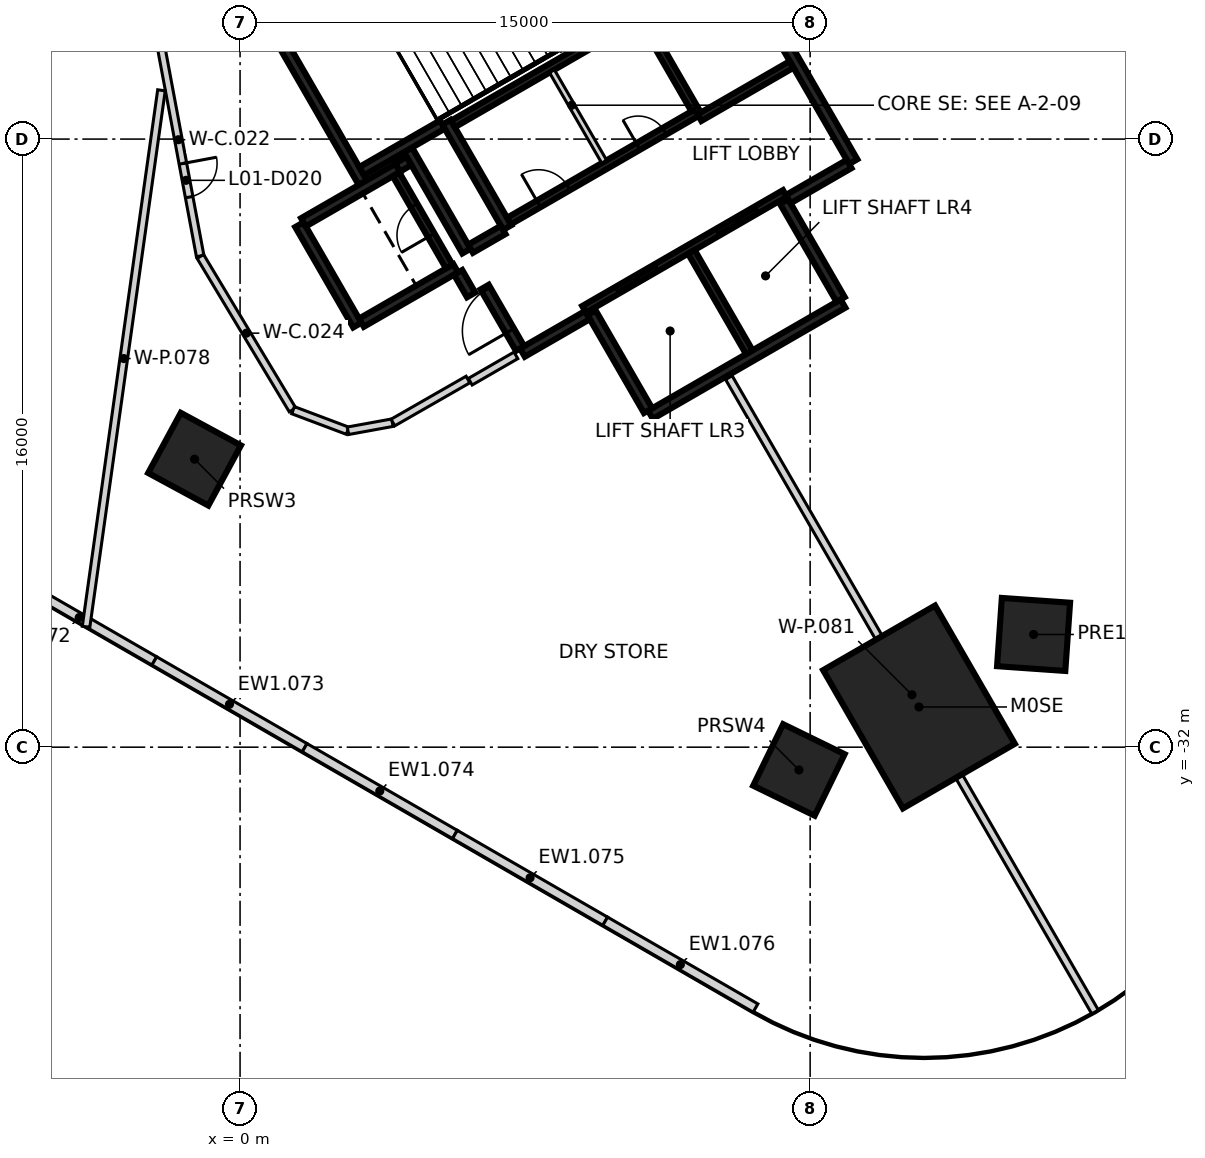
"""IFC4 building model, lengths in metres.
Left out: names, types, materials, properties, quantities, classifications, styles, units other than length and angle.
Written with IfcOpenShell. Run it as: python <this file> out.ifc"""

import sys

from ifc_helpers import new_model, si_unit, direction, frame, frame_2d, origin, origin_2d, place, context, subcontext, project, spatial, polyline, rectangle, outline, extrude, element, fill, save


model = new_model("IFC4")
c1 = context("Model", 3, precision=1e-05, world=origin(), true_north=direction((0.0, 1.0)))
c2 = subcontext(c1, "Body", "Model", "MODEL_VIEW")
j1 = project(units=[si_unit("LENGTHUNIT", "METRE"), si_unit("PLANEANGLEUNIT", "RADIAN")], contexts=[c1])
p1 = place(None, origin())
s1 = spatial("IfcSite", under=j1, at=p1, CompositionType="ELEMENT")
p2 = place(p1, origin())
s2 = spatial("IfcBuilding", under=s1, at=p2, CompositionType="ELEMENT")
p3 = place(p2, frame((0.0, 0.0, 7.5)))
s3 = spatial("IfcBuildingStorey", under=s2, at=p3, CompositionType="ELEMENT", Elevation=7.5)
p4 = place(p3, frame((17.865, -30.942, -0.4), z_axis=(0.0, 0.0, 1.0), x_axis=(-0.5, 0.866025403784, 0.0)))
e1 = element("IfcColumn", 1, at=p4, inside=s3, PredefinedType="COLUMN", context=c2, shape_type="SweptSolid", body=[
    extrude(rectangle(XDim=4.2, YDim=3.4, at=origin_2d()), origin(), (0.0, 0.0, 1.0), 6.55),
])
for number, where, z_axis, x_axis in (
    (2, (20.879, -29.034, -0.4), (0.0, 0.0, 1.0), (-0.998, 0.07, 0.0)),
    (3, (-1.197, -24.423, -0.4), (0.0, 0.0, 1.0), (0.476, 0.879, 0.0)),
    (4, (14.705, -32.599, -0.4), (0.0, 0.0, 1.0), (0.438, 0.899, 0.0)),
):
    element("IfcColumn", number, at=place(p3, frame(where, z_axis=z_axis, x_axis=x_axis)), inside=s3, PredefinedType="COLUMN", context=c2, shape_type="SweptSolid", body=[
        extrude(rectangle(XDim=1.8, YDim=1.8, at=origin_2d()), origin(), (0.0, 0.0, 1.0), 4.15),
    ])
for number, where, z_axis, x_axis in (
    (5, (-2.256, -29.73, 0.0), (0.0, 0.0, 1.0), (-0.866, 0.5, 0.0)),
    (6, (1.699, -32.013, 0.0), (0.0, 0.0, 1.0), (-0.866, 0.5, 0.0)),
):
    element("IfcWall", number, at=place(p3, frame(where, z_axis=z_axis, x_axis=x_axis)), inside=s3, PredefinedType="SOLIDWALL", context=c2, shape_type="SweptSolid", body=[
        extrude(rectangle(XDim=4.566, YDim=0.25, at=frame_2d((2.283, 0.0))), origin(), (0.0, 0.0, 1.0), 6.15),
    ])
p5 = place(p3, frame((5.653, -34.297, 0.0), z_axis=(0.0, 0.0, 1.0), x_axis=(-0.866010176527, 0.500026373457, 0.0)))
e7 = element("IfcWall", 7, at=p5, inside=s3, PredefinedType="SOLIDWALL", context=c2, shape_type="SweptSolid", body=[
    extrude(rectangle(XDim=4.566, YDim=0.25, at=frame_2d((2.283, 0.0))), origin(), (0.0, 0.0, 1.0), 6.15),
])
p6 = place(p3, frame((9.608, -36.58, 0.0), z_axis=(0.0, 0.0, 1.0), x_axis=(-0.866023543838, 0.500003221507, 0.0)))
e8 = element("IfcWall", 8, at=p6, inside=s3, PredefinedType="SOLIDWALL", context=c2, shape_type="SweptSolid", body=[
    extrude(rectangle(XDim=4.566, YDim=0.25, at=frame_2d((2.283, 0.0))), origin(), (0.0, 0.0, 1.0), 6.15),
])
p7 = place(p3, frame((13.562, -38.863, 0.0), z_axis=(0.0, 0.0, 1.0), x_axis=(-0.866046694585, 0.499963121439, 0.0)))
e9 = element("IfcWall", 9, at=p7, inside=s3, PredefinedType="SOLIDWALL", context=c2, shape_type="SweptSolid", body=[
    extrude(rectangle(XDim=4.566, YDim=0.25, at=frame_2d((2.283, 0.0))), origin(), (0.0, 0.0, 1.0), 6.15),
])
p8 = place(p3, origin())
e10 = element("IfcWall", 10, at=p8, inside=s3, PredefinedType="SOLIDWALL", context=c2, shape_type="SweptSolid", body=[
    extrude(outline(polyline([(13.5, -38.971), (14.556, -39.492), (15.671, -39.87), (16.244, -40.004), (17.411, -40.158), (18.589, -40.158), (19.175, -40.1), (20.329, -39.87), (21.444, -39.492), (22.5, -38.971), (23.0, -38.66), (23.479, -38.317), (24.364, -37.541), (25.14, -36.656), (25.483, -36.177), (26.072, -35.157), (26.522, -34.07), (26.827, -32.933), (26.981, -31.766), (27.0, -31.177), (26.75, -31.169), (26.731, -31.745), (26.581, -32.884), (26.285, -33.989), (25.847, -35.047), (25.273, -36.042), (24.944, -36.5), (24.187, -37.364), (23.323, -38.121), (22.861, -38.452), (22.378, -38.752), (21.348, -39.26), (20.265, -39.628), (19.138, -39.852), (18.576, -39.908), (17.428, -39.908), (16.289, -39.758), (15.739, -39.63), (14.652, -39.26), (13.611, -38.747), (13.5, -38.971)])), origin(), (0.0, 0.0, 1.0), 6.15),
])
p9 = place(p3, frame((13.008, -11.181, 0.0), z_axis=(0.0, 0.0, 1.0), x_axis=(0.500004234368, -0.866022959057, 0.0)))
e11 = element("IfcWall", 11, at=p9, inside=s3, PredefinedType="SHEAR", context=c2, shape_type="SweptSolid", body=[
    extrude(rectangle(XDim=6.25, YDim=0.25, at=frame_2d((3.125, 0.0))), origin(), (0.0, 0.0, 1.0), 6.15),
])
p10 = place(p3, frame((15.865, -20.328, 0.0), z_axis=(0.0, 0.0, 1.0), x_axis=(-0.86602852612, -0.499994591916, 0.0)))
e12 = element("IfcWall", 12, at=p10, inside=s3, PredefinedType="SHEAR", context=c2, shape_type="SweptSolid", body=[
    extrude(rectangle(XDim=5.85, YDim=0.25, at=frame_2d((2.925, 0.0))), origin(), (0.0, 0.0, 1.0), 6.15),
])
p11 = place(p3, frame((3.235, -17.153, 0.0), z_axis=(0.0, 0.0, 1.0), x_axis=(-0.500008851346, 0.866020293397, 0.0)))
e13 = element("IfcWall", 13, at=p11, inside=s3, PredefinedType="SHEAR", context=c2, shape_type="SweptSolid", body=[
    extrude(rectangle(XDim=5.51, YDim=0.25, at=frame_2d((2.755, 0.0))), origin(), (0.0, 0.0, 1.0), 6.15),
])
p12 = place(p3, frame((7.031, -18.327, 0.0), z_axis=(0.0, 0.0, 1.0), x_axis=(-0.499971222258, 0.866042017984, 0.0)))
e14 = element("IfcWall", 14, at=p12, inside=s3, PredefinedType="SHEAR", context=c2, shape_type="SweptSolid", body=[
    extrude(rectangle(XDim=3.2, YDim=0.25, at=frame_2d((1.6, 0.0))), origin(), (0.0, 0.0, 1.0), 6.15),
])
for number, where, z_axis, x_axis in (
    (15, (14.315, -17.644, 0.0), (0.0, 0.0, 1.0), (0.5, -0.866, 0.0)),
    (16, (10.736, -23.145, 0.0), (0.0, 0.0, 1.0), (-0.5, 0.866, 0.0)),
):
    element("IfcWall", number, at=place(p3, frame(where, z_axis=z_axis, x_axis=x_axis)), inside=s3, PredefinedType="SHEAR", context=c2, shape_type="SweptSolid", body=[
        extrude(rectangle(XDim=2.974, YDim=0.25, at=frame_2d((1.487, 0.0))), origin(), (0.0, 0.0, 1.0), 6.15),
    ])
p13 = place(p3, frame((3.085, -20.894, 0.0), z_axis=(0.0, 0.0, 1.0), x_axis=(-0.499978833458, 0.866037623948, 0.0)))
e17 = element("IfcWall", 17, at=p13, inside=s3, PredefinedType="SHEAR", context=c2, shape_type="SweptSolid", body=[
    extrude(rectangle(XDim=3.05, YDim=0.25, at=frame_2d((1.525, 0.0))), origin(), (0.0, 0.0, 1.0), 6.15),
])
p14 = place(p3, frame((1.669, -18.19, 0.0), z_axis=(0.0, 0.0, 1.0), x_axis=(0.866042235819, 0.499970844928, 0.0)))
e18 = element("IfcWall", 18, at=p14, inside=s3, PredefinedType="SHEAR", context=c2, shape_type="SweptSolid", body=[
    extrude(rectangle(XDim=2.865, YDim=0.25, at=frame_2d((1.432, 0.0))), origin(), (0.0, 0.0, 1.0), 6.15),
])
p15 = place(p3, frame((5.675, -19.399, 0.0), z_axis=(0.0, 0.0, 1.0), x_axis=(-0.866026637627, -0.499997862916, 0.0)))
e19 = element("IfcWall", 19, at=p15, inside=s3, PredefinedType="SHEAR", context=c2, shape_type="SweptSolid", body=[
    extrude(rectangle(XDim=2.865, YDim=0.25, at=frame_2d((1.432, 0.0))), origin(), (0.0, 0.0, 1.0), 6.15),
])
p16 = place(p3, frame((4.414, -16.276, 0.0), z_axis=(0.0, 0.0, 1.0), x_axis=(0.500003324108, -0.866023484601, 0.0)))
e20 = element("IfcWall", 20, at=p16, inside=s3, PredefinedType="SHEAR", context=c2, shape_type="SweptSolid", body=[
    extrude(rectangle(XDim=3.085, YDim=0.25, at=frame_2d((1.542, 0.0))), origin(), (0.0, 0.0, 1.0), 6.15),
])
p17 = place(p3, frame((5.322, -15.619, 0.0), z_axis=(0.0, 0.0, 1.0), x_axis=(-0.866026229868, -0.499998569178, 0.0)))
e21 = element("IfcWall", 21, at=p17, inside=s3, PredefinedType="SHEAR", context=c2, shape_type="SweptSolid", body=[
    extrude(rectangle(XDim=2.449, YDim=0.25, at=frame_2d((1.225, 0.0))), origin(), (0.0, 0.0, 1.0), 6.15),
])
p18 = place(p3, frame((9.14, -20.631, 0.0), z_axis=(0.0, 0.0, 1.0), x_axis=(-0.866043531843, -0.499968599967, 0.0)))
e22 = element("IfcWall", 22, at=p18, inside=s3, PredefinedType="SHEAR", context=c2, shape_type="SweptSolid", body=[
    extrude(rectangle(XDim=1.975, YDim=0.25, at=frame_2d((0.987, 0.0))), origin(), (0.0, 0.0, 1.0), 6.15),
])
p19 = place(p3, frame((16.025, -16.656, 0.0), z_axis=(0.0, 0.0, 1.0), x_axis=(-0.866016279763, -0.500015802937, 0.0)))
e23 = element("IfcWall", 23, at=p19, inside=s3, PredefinedType="SHEAR", context=c2, shape_type="SweptSolid", body=[
    extrude(rectangle(XDim=1.849, YDim=0.25, at=frame_2d((0.925, 0.0))), origin(), (0.0, 0.0, 1.0), 6.15),
])
p20 = place(p3, frame((7.367, -21.51, 0.0), z_axis=(0.0, 0.0, 1.0), x_axis=(-0.499983108224, 0.866035156036, 0.0)))
e24 = element("IfcWall", 24, at=p20, inside=s3, PredefinedType="SHEAR", context=c2, shape_type="SweptSolid", body=[
    extrude(rectangle(XDim=1.865, YDim=0.25, at=frame_2d((0.932, 0.0))), origin(), (0.0, 0.0, 1.0), 6.15),
])
p21 = place(p20, frame((0.535, 0.0, 0.0)))
e25 = element("IfcOpeningElement", 25, at=p21, cuts=e24, PredefinedType="OPENING", context=c2, shape_type="SweptSolid", body=[
    extrude(rectangle(XDim=1.25, YDim=2.1, at=frame_2d((0.625, 1.05))), frame((0.0, 0.135, 0.0), z_axis=(0.0, -1.0, 0.0), x_axis=(1.0, 0.0, 0.0)), (0.0, 0.0, 1.0), 0.27),
])
p22 = place(p3, frame((6.065, -18.885, 0.0), z_axis=(0.0, 0.0, 1.0), x_axis=(0.866017078145, 0.500014420154, 0.0)))
e26 = element("IfcWall", 26, at=p22, inside=s3, PredefinedType="SHEAR", context=c2, shape_type="SweptSolid", body=[
    extrude(rectangle(XDim=0.989, YDim=0.25, at=frame_2d((0.495, 0.0))), origin(), (0.0, 0.0, 1.0), 6.15),
])
p23 = place(p3, frame((6.08, -20.1, 0.0), z_axis=(0.0, 0.0, 1.0), x_axis=(-0.500051773299, 0.865995510393, 0.0)))
e27 = element("IfcWall", 27, at=p23, inside=s3, PredefinedType="SHEAR", context=c2, shape_type="SweptSolid", body=[
    extrude(rectangle(XDim=0.685, YDim=0.25, at=frame_2d((0.342, 0.0))), origin(), (0.0, 0.0, 1.0), 6.15),
])
p24 = place(p3, frame((4.145, -16.749, 0.0), z_axis=(0.0, 0.0, 1.0), x_axis=(0.866185586049, 0.49972245349, 0.0)))
e28 = element("IfcWall", 28, at=p24, inside=s3, PredefinedType="SHEAR", context=c2, shape_type="SweptSolid", body=[
    extrude(rectangle(XDim=0.344, YDim=0.25, at=frame_2d((0.172, 0.0))), origin(), (0.0, 0.0, 1.0), 6.15),
])
p25 = place(p3, frame((9.052, -20.48, 0.0), z_axis=(0.0, 0.0, 1.0), x_axis=(0.866030299012, 0.499991521122, 0.0)))
e29 = element("IfcWall", 29, at=p25, inside=s3, PredefinedType="SHEAR", context=c2, shape_type="SweptSolid", body=[
    extrude(rectangle(XDim=6.1, YDim=0.2, at=frame_2d((3.05, 0.0))), origin(), (0.0, 0.0, 1.0), 6.15),
])
p26 = place(p25, frame((1.0, 0.0, 0.0)))
e30 = element("IfcOpeningElement", 30, at=p26, cuts=e29, PredefinedType="OPENING", context=c2, shape_type="SweptSolid", body=[
    extrude(rectangle(XDim=1.2, YDim=2.1, at=frame_2d((0.6, 1.05))), frame((0.0, 0.11, 0.0), z_axis=(0.0, -1.0, 0.0), x_axis=(1.0, 0.0, 0.0)), (0.0, 0.0, 1.0), 0.22),
])
p27 = place(p25, frame((4.05, 0.0, 0.0)))
e31 = element("IfcOpeningElement", 31, at=p27, cuts=e29, PredefinedType="OPENING", context=c2, shape_type="SweptSolid", body=[
    extrude(rectangle(XDim=1.2, YDim=2.1, at=frame_2d((0.6, 1.05))), frame((0.0, 0.11, 0.0), z_axis=(0.0, -1.0, 0.0), x_axis=(1.0, 0.0, 0.0)), (0.0, 0.0, 1.0), 0.22),
])
p28 = place(p3, frame((10.538, -12.752, 0.0), z_axis=(0.0, 0.0, 1.0), x_axis=(-0.866038630372, -0.499977090179, 0.0)))
e32 = element("IfcWall", 32, at=p28, inside=s3, PredefinedType="SHEAR", context=c2, shape_type="SweptSolid", body=[
    extrude(rectangle(XDim=5.699, YDim=0.2, at=frame_2d((2.85, 0.0))), origin(), (0.0, 0.0, 1.0), 6.15),
])
p29 = place(p3, frame((7.077, -18.156, 0.0), z_axis=(0.0, 0.0, 1.0), x_axis=(0.866038630372, 0.499977090179, 0.0)))
e33 = element("IfcWall", 33, at=p29, inside=s3, PredefinedType="SHEAR", context=c2, shape_type="SweptSolid", body=[
    extrude(rectangle(XDim=5.699, YDim=0.2, at=frame_2d((2.85, 0.0))), origin(), (0.0, 0.0, 1.0), 6.15),
])
p30 = place(p29, frame((0.899, 0.0, 0.0)))
e34 = element("IfcOpeningElement", 34, at=p30, cuts=e33, PredefinedType="OPENING", context=c2, shape_type="SweptSolid", body=[
    extrude(rectangle(XDim=0.9, YDim=2.1, at=frame_2d((0.45, 1.05))), frame((0.0, 0.11, 0.0), z_axis=(0.0, -1.0, 0.0), x_axis=(1.0, 0.0, 0.0)), (0.0, 0.0, 1.0), 0.22),
])
p31 = place(p29, frame((3.924, 0.0, 0.0)))
e35 = element("IfcOpeningElement", 35, at=p31, cuts=e33, PredefinedType="OPENING", context=c2, shape_type="SweptSolid", body=[
    extrude(rectangle(XDim=0.8, YDim=2.1, at=frame_2d((0.4, 1.05))), frame((0.0, 0.11, 0.0), z_axis=(0.0, -1.0, 0.0), x_axis=(1.0, 0.0, 0.0)), (0.0, 0.0, 1.0), 0.22),
])
p32 = place(p3, frame((11.875, -18.967, 0.0), z_axis=(0.0, 0.0, 1.0), x_axis=(0.49998131003, -0.866036194175, 0.0)))
e36 = element("IfcWall", 36, at=p32, inside=s3, PredefinedType="SHEAR", context=c2, shape_type="SweptSolid", body=[
    extrude(rectangle(XDim=3.048, YDim=0.2, at=frame_2d((1.524, 0.0))), origin(), (0.0, 0.0, 1.0), 6.15),
])
p33 = place(p3, frame((5.503, -19.352, 0.0), z_axis=(0.0, 0.0, 1.0), x_axis=(-0.499986818241, 0.866033014143, 0.0)))
e37 = element("IfcWall", 37, at=p33, inside=s3, PredefinedType="SHEAR", context=c2, shape_type="SweptSolid", body=[
    extrude(rectangle(XDim=2.798, YDim=0.2, at=frame_2d((1.399, 0.0))), origin(), (0.0, 0.0, 1.0), 6.15),
])
p34 = place(p33, frame((0.949, 0.0, 0.0)))
e38 = element("IfcOpeningElement", 38, at=p34, cuts=e37, PredefinedType="OPENING", context=c2, shape_type="SweptSolid", body=[
    extrude(rectangle(XDim=0.9, YDim=2.1, at=frame_2d((0.45, 1.05))), frame((0.0, 0.11, 0.0), z_axis=(0.0, -1.0, 0.0), x_axis=(1.0, 0.0, 0.0)), (0.0, 0.0, 1.0), 0.22),
])
p35 = place(p3, frame((11.963, -15.22, 0.0), z_axis=(0.0, 0.0, 1.0), x_axis=(-0.500034990121, 0.866005201286, 0.0)))
e39 = element("IfcWall", 39, at=p35, inside=s3, PredefinedType="SHEAR", context=c2, shape_type="SweptSolid", body=[
    extrude(rectangle(XDim=2.75, YDim=0.2, at=frame_2d((1.375, 0.0))), origin(), (0.0, 0.0, 1.0), 6.15),
])
p36 = place(p3, frame((14.512, -14.037, 0.0), z_axis=(0.0, 0.0, 1.0), x_axis=(-0.866044696403, -0.499966582715, 0.0)))
e40 = element("IfcWall", 40, at=p36, inside=s3, PredefinedType="SHEAR", context=c2, shape_type="SweptSolid", body=[
    extrude(rectangle(XDim=2.799, YDim=0.2, at=frame_2d((1.399, 0.0))), origin(), (0.0, 0.0, 1.0), 6.15),
])
p37 = place(p3, frame((8.207, -14.214, 0.0), z_axis=(0.0, 0.0, 1.0), x_axis=(0.50002746344, -0.86600954718, 0.0)))
e41 = element("IfcWall", 41, at=p37, inside=s3, PredefinedType="PARTITIONING", context=c2, shape_type="SweptSolid", body=[
    extrude(rectangle(XDim=2.748, YDim=0.15, at=frame_2d((1.374, 0.0))), origin(), (0.0, 0.0, 1.0), 6.15),
])
p38 = place(p3, frame((-2.194, -12.956, 0.0), z_axis=(0.0, 0.0, 1.0), x_axis=(0.183765348318, -0.982970140318, 0.0)))
e42 = element("IfcWall", 42, at=p38, inside=s3, PredefinedType="PARTITIONING", context=c2, shape_type="SweptSolid", body=[
    extrude(rectangle(XDim=6.227, YDim=0.2, at=frame_2d((3.113, 0.0))), origin(), (0.0, 0.0, 1.0), 6.15),
])
p39 = place(p38, frame((3.75, 0.0, 0.0)))
e43 = element("IfcOpeningElement", 43, at=p39, cuts=e42, PredefinedType="OPENING", context=c2, shape_type="SweptSolid", body=[
    extrude(rectangle(XDim=0.9, YDim=2.1, at=frame_2d((0.45, 1.05))), frame((0.0, 0.11, 0.0), z_axis=(0.0, -1.0, 0.0), x_axis=(1.0, 0.0, 0.0)), (0.0, 0.0, 1.0), 0.22),
])
p40 = place(p3, frame((-1.045, -19.088, 0.0), z_axis=(0.0, 0.0, 1.0), x_axis=(0.51489213726, -0.857254971982, 0.0)))
e44 = element("IfcWall", 44, at=p40, inside=s3, PredefinedType="PARTITIONING", context=c2, shape_type="SweptSolid", body=[
    extrude(rectangle(XDim=4.709, YDim=0.2, at=frame_2d((2.354, 0.0))), origin(), (0.0, 0.0, 1.0), 6.15),
])
p41 = place(p3, frame((1.394, -23.133, 0.0), z_axis=(0.0, 0.0, 1.0), x_axis=(0.935740267615, -0.352689880154, 0.0)))
e45 = element("IfcWall", 45, at=p41, inside=s3, PredefinedType="PARTITIONING", context=c2, shape_type="SweptSolid", body=[
    extrude(rectangle(XDim=1.537, YDim=0.2, at=frame_2d((0.768, 0.0))), origin(), (0.0, 0.0, 1.0), 6.15),
])
p42 = place(p3, frame((2.839, -23.675, 0.0), z_axis=(0.0, 0.0, 1.0), x_axis=(0.983781026783, 0.179373608267, 0.0)))
e46 = element("IfcWall", 46, at=p42, inside=s3, PredefinedType="PARTITIONING", context=c2, shape_type="SweptSolid", body=[
    extrude(rectangle(XDim=1.188, YDim=0.2, at=frame_2d((0.594, 0.0))), origin(), (0.0, 0.0, 1.0), 6.15),
])
p43 = place(p3, frame((4.022, -23.458, 0.0), z_axis=(0.0, 0.0, 1.0), x_axis=(0.867589037082, 0.49728187453, 0.0)))
e47 = element("IfcWall", 47, at=p43, inside=s3, PredefinedType="PARTITIONING", context=c2, shape_type="SweptSolid", body=[
    extrude(rectangle(XDim=2.277, YDim=0.2, at=frame_2d((1.138, 0.0))), origin(), (0.0, 0.0, 1.0), 6.15),
])
p44 = place(p3, frame((6.057, -22.384, 0.0), z_axis=(0.0, 0.0, 1.0), x_axis=(0.866100566266, 0.499869792159, 0.0)))
e48 = element("IfcWall", 48, at=p44, inside=s3, PredefinedType="PARTITIONING", context=c2, shape_type="SweptSolid", body=[
    extrude(rectangle(XDim=1.386, YDim=0.2, at=frame_2d((0.693, 0.0))), origin(), (0.0, 0.0, 1.0), 6.15),
])
p45 = place(p3, frame((-4.052, -28.832, 0.0), z_axis=(0.0, 0.0, 1.0), x_axis=(0.139178988917, 0.990267241225, 0.0)))
e49 = element("IfcWall", 49, at=p45, inside=s3, PredefinedType="PARTITIONING", context=c2, shape_type="SweptSolid", body=[
    extrude(rectangle(XDim=14.254, YDim=0.2, at=frame_2d((7.127, 0.0))), origin(), (0.0, 0.0, 1.0), 3.75),
])
p46 = place(p3, frame((12.861, -22.276, 0.0), z_axis=(0.0, 0.0, 1.0), x_axis=(0.499989278408, -0.86603159381, 0.0)))
e50 = element("IfcWall", 50, at=p46, inside=s3, PredefinedType="PARTITIONING", context=c2, shape_type="SweptSolid", body=[
    extrude(rectangle(XDim=19.273, YDim=0.2, at=frame_2d((9.636, 0.0))), origin(), (0.0, 0.0, 1.0), 6.15),
])
p47 = place(p26, origin())
e51 = element("IfcDoor", 51, at=p47, inside=s3, OperationType="DOUBLE_DOOR_SLIDING", PredefinedType="DOOR", context=c2, shape_type="SweptSolid", body=[
    extrude(rectangle(XDim=1.2, YDim=2.1, at=frame_2d((0.6, 1.05))), frame((0.0, 0.025, 0.0), z_axis=(0.0, -1.0, 0.0), x_axis=(1.0, 0.0, 0.0)), (0.0, 0.0, 1.0), 0.05),
])
fill(e30, e51)
p48 = place(p27, origin())
e52 = element("IfcDoor", 52, at=p48, inside=s3, OperationType="DOUBLE_DOOR_SLIDING", PredefinedType="DOOR", context=c2, shape_type="SweptSolid", body=[
    extrude(rectangle(XDim=1.2, YDim=2.1, at=frame_2d((0.6, 1.05))), frame((0.0, 0.025, 0.0), z_axis=(0.0, -1.0, 0.0), x_axis=(1.0, 0.0, 0.0)), (0.0, 0.0, 1.0), 0.05),
])
fill(e31, e52)
p49 = place(p21, origin())
e53 = element("IfcDoor", 53, at=p49, inside=s3, OperationType="SINGLE_SWING_LEFT", PredefinedType="DOOR", context=c2, shape_type="SweptSolid", body=[
    extrude(rectangle(XDim=1.25, YDim=2.1, at=frame_2d((0.625, 1.05))), frame((0.0, 0.025, 0.0), z_axis=(0.0, -1.0, 0.0), x_axis=(1.0, 0.0, 0.0)), (0.0, 0.0, 1.0), 0.05),
])
fill(e25, e53)
p50 = place(p30, origin())
e54 = element("IfcDoor", 54, at=p50, inside=s3, OperationType="SINGLE_SWING_RIGHT", PredefinedType="DOOR", context=c2, shape_type="SweptSolid", body=[
    extrude(rectangle(XDim=0.9, YDim=2.1, at=frame_2d((0.45, 1.05))), frame((0.0, 0.025, 0.0), z_axis=(0.0, -1.0, 0.0), x_axis=(1.0, 0.0, 0.0)), (0.0, 0.0, 1.0), 0.05),
])
fill(e34, e54)
p51 = place(p31, origin())
e55 = element("IfcDoor", 55, at=p51, inside=s3, OperationType="SINGLE_SWING_LEFT", PredefinedType="DOOR", context=c2, shape_type="SweptSolid", body=[
    extrude(rectangle(XDim=0.8, YDim=2.1, at=frame_2d((0.4, 1.05))), frame((0.0, 0.025, 0.0), z_axis=(0.0, -1.0, 0.0), x_axis=(1.0, 0.0, 0.0)), (0.0, 0.0, 1.0), 0.05),
])
fill(e35, e55)
p52 = place(p34, origin())
e56 = element("IfcDoor", 56, at=p52, inside=s3, OperationType="SINGLE_SWING_RIGHT", PredefinedType="DOOR", context=c2, shape_type="SweptSolid", body=[
    extrude(rectangle(XDim=0.9, YDim=2.1, at=frame_2d((0.45, 1.05))), frame((0.0, 0.025, 0.0), z_axis=(0.0, -1.0, 0.0), x_axis=(1.0, 0.0, 0.0)), (0.0, 0.0, 1.0), 0.05),
])
fill(e38, e56)
p53 = place(p39, origin())
e57 = element("IfcDoor", 57, at=p53, inside=s3, OperationType="SINGLE_SWING_LEFT", PredefinedType="DOOR", context=c2, shape_type="SweptSolid", body=[
    extrude(rectangle(XDim=0.9, YDim=2.1, at=frame_2d((0.45, 1.05))), frame((0.0, 0.025, 0.0), z_axis=(0.0, -1.0, 0.0), x_axis=(1.0, 0.0, 0.0)), (0.0, 0.0, 1.0), 0.05),
])
fill(e43, e57)
save(model, sys.argv[1])
